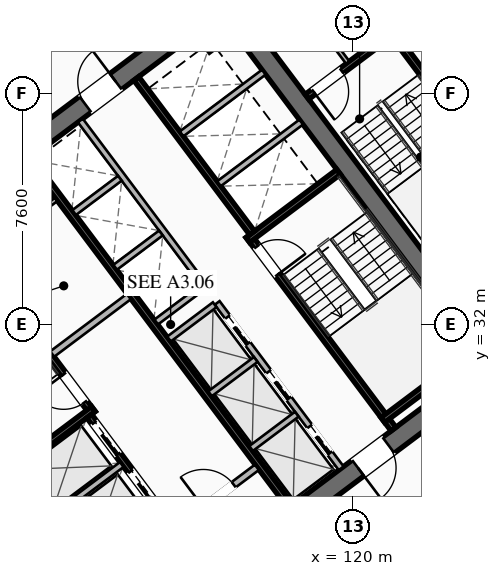
"""IFC4 building model, lengths in metres.
Left out: names, types, materials, properties, quantities, classifications, styles, units other than length and angle.
Written with IfcOpenShell. Run it as: python <this file> out.ifc"""

import sys

from ifc_helpers import new_model, si_unit, direction, frame, frame_2d, origin, place, context, subcontext, project, spatial, rectangle, extrude, element, fill, save


model = new_model("IFC4")
c1 = context("Model", 3, precision=1e-05, world=origin(), true_north=direction((0.0, 1.0)))
c2 = subcontext(c1, "Body", "Model", "MODEL_VIEW")
j1 = project(units=[si_unit("LENGTHUNIT", "METRE"), si_unit("PLANEANGLEUNIT", "RADIAN")], contexts=[c1])
p1 = place(None, origin())
s1 = spatial("IfcSite", under=j1, at=p1, CompositionType="ELEMENT")
p2 = place(p1, origin())
s2 = spatial("IfcBuilding", under=s1, at=p2, CompositionType="ELEMENT")
p3 = place(p2, frame((0.0, 0.0, 77.85)))
s3 = spatial("IfcBuildingStorey", under=s2, at=p3, CompositionType="ELEMENT", Elevation=77.85)
for number, where, z_axis, x_axis in (
    (1, (112.476, 21.107, 0.0), (0.0, 0.0, 1.0), (-0.6, 0.8, 0.0)),
    (2, (115.524, 42.893, 0.0), (0.0, 0.0, 1.0), (0.6, -0.8, 0.0)),
):
    element("IfcWall", number, at=place(p3, frame(where, z_axis=z_axis, x_axis=x_axis)), inside=s3, PredefinedType="SHEAR", context=c2, shape_type="SweptSolid", body=[
        extrude(rectangle(XDim=15.6, YDim=0.65, at=frame_2d((7.8, 0.0))), origin(), (0.0, 0.0, 1.0), 3.55),
    ])
p4 = place(p3, frame((124.429, 30.478, 0.0), z_axis=(0.0, 0.0, 1.0), x_axis=(-0.799998028465, -0.600002628705, 0.0)))
e3 = element("IfcWall", 3, at=p4, inside=s3, PredefinedType="SHEAR", context=c2, shape_type="SweptSolid", body=[
    extrude(rectangle(XDim=14.86, YDim=0.65, at=frame_2d((7.43, 0.0))), origin(), (0.0, 0.0, 1.0), 3.55),
])
p5 = place(p4, frame((9.13, 0.0, 0.0)))
e4 = element("IfcOpeningElement", 4, at=p5, cuts=e3, PredefinedType="OPENING", context=c2, shape_type="SweptSolid", body=[
    extrude(rectangle(XDim=1.25, YDim=2.25, at=frame_2d((0.625, 1.125))), frame((0.0, 0.335, 0.0), z_axis=(0.0, -1.0, 0.0), x_axis=(1.0, 0.0, 0.0)), (0.0, 0.0, 1.0), 0.67),
])
p6 = place(p4, frame((4.08, 0.0, 0.0)))
e5 = element("IfcOpeningElement", 5, at=p6, cuts=e3, PredefinedType="OPENING", context=c2, shape_type="SweptSolid", body=[
    extrude(rectangle(XDim=1.25, YDim=2.25, at=frame_2d((0.625, 1.125))), frame((0.0, 0.335, 0.0), z_axis=(0.0, -1.0, 0.0), x_axis=(1.0, 0.0, 0.0)), (0.0, 0.0, 1.0), 0.67),
])
p7 = place(p3, frame((103.571, 33.522, 0.0), z_axis=(0.0, 0.0, 1.0), x_axis=(0.799998028465, 0.600002628705, 0.0)))
e6 = element("IfcWall", 6, at=p7, inside=s3, PredefinedType="SHEAR", context=c2, shape_type="SweptSolid", body=[
    extrude(rectangle(XDim=14.86, YDim=0.65, at=frame_2d((7.43, 0.0))), origin(), (0.0, 0.0, 1.0), 3.55),
])
p8 = place(p7, frame((4.48, 0.0, 0.0)))
e7 = element("IfcOpeningElement", 7, at=p8, cuts=e6, PredefinedType="OPENING", context=c2, shape_type="SweptSolid", body=[
    extrude(rectangle(XDim=1.25, YDim=2.25, at=frame_2d((0.625, 1.125))), frame((0.0, 0.335, 0.0), z_axis=(0.0, -1.0, 0.0), x_axis=(1.0, 0.0, 0.0)), (0.0, 0.0, 1.0), 0.67),
])
p9 = place(p7, frame((9.53, 0.0, 0.0)))
e8 = element("IfcOpeningElement", 8, at=p9, cuts=e6, PredefinedType="OPENING", context=c2, shape_type="SweptSolid", body=[
    extrude(rectangle(XDim=1.25, YDim=2.25, at=frame_2d((0.625, 1.125))), frame((0.0, 0.335, 0.0), z_axis=(0.0, -1.0, 0.0), x_axis=(1.0, 0.0, 0.0)), (0.0, 0.0, 1.0), 0.67),
])
p10 = place(p3, frame((111.44, 29.08, 0.0), z_axis=(0.0, 0.0, 1.0), x_axis=(-0.600009827119, 0.799992629566, 0.0)))
e9 = element("IfcWall", 9, at=p10, inside=s3, PredefinedType="SHEAR", context=c2, shape_type="SweptSolid", body=[
    extrude(rectangle(XDim=7.95, YDim=0.2, at=frame_2d((3.975, 0.0))), origin(), (0.0, 0.0, 1.0), 3.35),
])
p11 = place(p10, frame((0.45, 0.0, 0.0)))
e10 = element("IfcOpeningElement", 10, at=p11, cuts=e9, PredefinedType="OPENING", context=c2, shape_type="SweptSolid", body=[
    extrude(rectangle(XDim=1.15, YDim=2.2, at=frame_2d((0.575, 1.1))), frame((0.0, 0.11, 0.0), z_axis=(0.0, -1.0, 0.0), x_axis=(1.0, 0.0, 0.0)), (0.0, 0.0, 1.0), 0.22),
])
p12 = place(p3, frame((108.476, 26.982, 0.0), z_axis=(0.0, 0.0, 1.0), x_axis=(0.799984290658, 0.600020945218, 0.0)))
e11 = element("IfcWall", 11, at=p12, inside=s3, PredefinedType="SHEAR", context=c2, shape_type="SweptSolid", body=[
    extrude(rectangle(XDim=3.73, YDim=0.2, at=frame_2d((1.865, 0.0))), origin(), (0.0, 0.0, 1.0), 3.35),
])
p13 = place(p3, frame((116.56, 34.92, 0.0), z_axis=(0.0, 0.0, 1.0), x_axis=(0.600009827119, -0.799992629566, 0.0)))
e12 = element("IfcWall", 12, at=p13, inside=s3, PredefinedType="SHEAR", context=c2, shape_type="SweptSolid", body=[
    extrude(rectangle(XDim=7.95, YDim=0.2, at=frame_2d((3.975, 0.0))), origin(), (0.0, 0.0, 1.0), 3.35),
])
p14 = place(p13, frame((0.45, 0.0, 0.0)))
e13 = element("IfcOpeningElement", 13, at=p14, cuts=e12, PredefinedType="OPENING", context=c2, shape_type="SweptSolid", body=[
    extrude(rectangle(XDim=1.15, YDim=2.2, at=frame_2d((0.575, 1.1))), frame((0.0, 0.11, 0.0), z_axis=(0.0, -1.0, 0.0), x_axis=(1.0, 0.0, 0.0)), (0.0, 0.0, 1.0), 0.22),
])
for number, where, z_axis, x_axis in (
    (14, (116.54, 34.78, 0.0), (0.0, 0.0, 1.0), (0.8, 0.6, 0.0)),
    (15, (120.98, 28.86, 0.0), (0.0, 0.0, 1.0), (0.8, 0.6, 0.0)),
):
    element("IfcWall", number, at=place(p3, frame(where, z_axis=z_axis, x_axis=x_axis)), inside=s3, PredefinedType="SHEAR", context=c2, shape_type="SweptSolid", body=[
        extrude(rectangle(XDim=3.73, YDim=0.2, at=frame_2d((1.865, 0.0))), origin(), (0.0, 0.0, 1.0), 3.35),
    ])
p15 = place(p3, frame((117.938, 26.016, 0.0), z_axis=(0.0, 0.0, 1.0), x_axis=(-0.600005463273, 0.799995902516, 0.0)))
e16 = element("IfcWall", 16, at=p15, inside=s3, PredefinedType="SHEAR", context=c2, shape_type="SweptSolid", body=[
    extrude(rectangle(XDim=14.3, YDim=0.2, at=frame_2d((7.15, 0.0))), origin(), (0.0, 0.0, 1.0), 3.35),
])
p16 = place(p3, frame((110.104, 31.028, 0.0), z_axis=(0.0, 0.0, 1.0), x_axis=(0.800018601094, 0.59997519774, 0.0)))
e17 = element("IfcWall", 17, at=p16, inside=s3, PredefinedType="SOLIDWALL", context=c2, shape_type="SweptSolid", body=[
    extrude(rectangle(XDim=3.15, YDim=0.22, at=frame_2d((1.575, 0.0))), origin(), (0.0, 0.0, 1.0), 2.703),
])
p17 = place(p3, frame((114.316, 25.412, 0.0), z_axis=(0.0, 0.0, 1.0), x_axis=(0.800018601094, 0.59997519774, 0.0)))
e18 = element("IfcWall", 18, at=p17, inside=s3, PredefinedType="SOLIDWALL", context=c2, shape_type="SweptSolid", body=[
    extrude(rectangle(XDim=3.15, YDim=0.22, at=frame_2d((1.575, 0.0))), origin(), (0.0, 0.0, 1.0), 2.703),
])
p18 = place(p17, frame((0.95, 0.0, 0.0)))
e19 = element("IfcOpeningElement", 19, at=p18, cuts=e18, PredefinedType="OPENING", context=c2, shape_type="SweptSolid", body=[
    extrude(rectangle(XDim=1.25, YDim=2.25, at=frame_2d((0.625, 1.125))), frame((0.0, 0.12, 0.0), z_axis=(0.0, -1.0, 0.0), x_axis=(1.0, 0.0, 0.0)), (0.0, 0.0, 1.0), 0.24),
])
p19 = place(p3, frame((115.13, 23.91, 0.0), z_axis=(0.0, 0.0, 1.0), x_axis=(-0.599975393228, 0.800018454488, 0.0)))
e20 = element("IfcWall", 20, at=p19, inside=s3, PredefinedType="SHEAR", context=c2, shape_type="SweptSolid", body=[
    extrude(rectangle(XDim=6.35, YDim=0.2, at=frame_2d((3.175, 0.0))), origin(), (0.0, 0.0, 1.0), 3.35),
])
p20 = place(p19, frame((4.775, 0.0, 0.0)))
e21 = element("IfcOpeningElement", 21, at=p20, cuts=e20, PredefinedType="OPENING", context=c2, shape_type="SweptSolid", body=[
    extrude(rectangle(XDim=1.3, YDim=2.25, at=frame_2d((0.65, 1.125))), frame((0.0, 0.11, 0.0), z_axis=(0.0, -1.0, 0.0), x_axis=(1.0, 0.0, 0.0)), (0.0, 0.0, 1.0), 0.22),
])
p21 = place(p19, frame((2.775, 0.0, 0.0)))
e22 = element("IfcOpeningElement", 22, at=p21, cuts=e20, PredefinedType="OPENING", context=c2, shape_type="SweptSolid", body=[
    extrude(rectangle(XDim=1.3, YDim=2.25, at=frame_2d((0.65, 1.125))), frame((0.0, 0.11, 0.0), z_axis=(0.0, -1.0, 0.0), x_axis=(1.0, 0.0, 0.0)), (0.0, 0.0, 1.0), 0.22),
])
p22 = place(p19, frame((0.575, 0.0, 0.0)))
e23 = element("IfcOpeningElement", 23, at=p22, cuts=e20, PredefinedType="OPENING", context=c2, shape_type="SweptSolid", body=[
    extrude(rectangle(XDim=1.3, YDim=2.25, at=frame_2d((0.65, 1.125))), frame((0.0, 0.11, 0.0), z_axis=(0.0, -1.0, 0.0), x_axis=(1.0, 0.0, 0.0)), (0.0, 0.0, 1.0), 0.22),
])
p23 = place(p3, frame((109.688, 25.366, 0.0), z_axis=(0.0, 0.0, 1.0), x_axis=(0.8, 0.6, 0.0)))
e24 = element("IfcWall", 24, at=p23, inside=s3, PredefinedType="SOLIDWALL", context=c2, shape_type="SweptSolid", body=[
    extrude(rectangle(XDim=3.38, YDim=0.2, at=frame_2d((1.69, 0.0))), origin(), (0.0, 0.0, 1.0), 3.35),
])
p24 = place(p3, frame((112.87, 40.09, 0.0), z_axis=(0.0, 0.0, 1.0), x_axis=(0.599975393228, -0.800018454488, 0.0)))
e25 = element("IfcWall", 25, at=p24, inside=s3, PredefinedType="SHEAR", context=c2, shape_type="SweptSolid", body=[
    extrude(rectangle(XDim=6.35, YDim=0.2, at=frame_2d((3.175, 0.0))), origin(), (0.0, 0.0, 1.0), 3.35),
])
for number, where, z_axis, x_axis in (
    (26, (115.59, 36.63, 0.0), (0.0, 0.0, 1.0), (0.8, 0.6, 0.0)),
    (27, (114.36, 38.27, 0.0), (0.0, 0.0, 1.0), (0.8, 0.6, 0.0)),
):
    element("IfcWall", number, at=place(p3, frame(where, z_axis=z_axis, x_axis=x_axis)), inside=s3, PredefinedType="SOLIDWALL", context=c2, shape_type="SweptSolid", body=[
        extrude(rectangle(XDim=3.38, YDim=0.2, at=frame_2d((1.69, 0.0))), origin(), (0.0, 0.0, 1.0), 3.35),
    ])
p25 = place(p3, frame((107.71, 34.22, 0.0), z_axis=(0.0, 0.0, 1.0), x_axis=(0.799981399002, 0.60002480053, 0.0)))
e28 = element("IfcWall", 28, at=p25, inside=s3, PredefinedType="PARTITIONING", context=c2, shape_type="SweptSolid", body=[
    extrude(rectangle(XDim=3.15, YDim=0.135, at=frame_2d((1.575, 0.0))), origin(), (0.0, 0.0, 1.0), 2.703),
])
p26 = place(p25, frame((1.05, 0.0, 0.0)))
e29 = element("IfcOpeningElement", 29, at=p26, cuts=e28, PredefinedType="OPENING", context=c2, shape_type="SweptSolid", body=[
    extrude(rectangle(XDim=1.05, YDim=2.2, at=frame_2d((0.525, 1.1))), frame((0.0, 0.077, 0.0), z_axis=(0.0, -1.0, 0.0), x_axis=(1.0, 0.0, 0.0)), (0.0, 0.0, 1.0), 0.155),
])
p27 = place(p3, frame((119.61, 27.27, 0.0), z_axis=(0.0, 0.0, 1.0), x_axis=(-0.600011488909, 0.79999138319, 0.0)))
e30 = element("IfcWall", 30, at=p27, inside=s3, PredefinedType="SOLIDWALL", context=c2, shape_type="SweptSolid", body=[
    extrude(rectangle(XDim=6.8, YDim=0.2, at=frame_2d((3.4, 0.0))), origin(), (0.0, 0.0, 1.0), 3.35),
])
p28 = place(p27, frame((0.625, 0.0, 0.0)))
e31 = element("IfcOpeningElement", 31, at=p28, cuts=e30, PredefinedType="OPENING", context=c2, shape_type="SweptSolid", body=[
    extrude(rectangle(XDim=1.1, YDim=2.2, at=frame_2d((0.55, 1.1))), frame((0.0, 0.11, 0.0), z_axis=(0.0, -1.0, 0.0), x_axis=(1.0, 0.0, 0.0)), (0.0, 0.0, 1.0), 0.22),
])
p29 = place(p27, frame((2.875, 0.0, 0.0)))
e32 = element("IfcOpeningElement", 32, at=p29, cuts=e30, PredefinedType="OPENING", context=c2, shape_type="SweptSolid", body=[
    extrude(rectangle(XDim=1.1, YDim=2.2, at=frame_2d((0.55, 1.1))), frame((0.0, 0.11, 0.0), z_axis=(0.0, -1.0, 0.0), x_axis=(1.0, 0.0, 0.0)), (0.0, 0.0, 1.0), 0.22),
])
p30 = place(p27, frame((5.125, 0.0, 0.0)))
e33 = element("IfcOpeningElement", 33, at=p30, cuts=e30, PredefinedType="OPENING", context=c2, shape_type="SweptSolid", body=[
    extrude(rectangle(XDim=1.1, YDim=2.2, at=frame_2d((0.55, 1.1))), frame((0.0, 0.11, 0.0), z_axis=(0.0, -1.0, 0.0), x_axis=(1.0, 0.0, 0.0)), (0.0, 0.0, 1.0), 0.22),
])
p31 = place(p3, frame((116.646, 27.922, 0.0), z_axis=(0.0, 0.0, 1.0), x_axis=(0.8, 0.6, 0.0)))
e34 = element("IfcWall", 34, at=p31, inside=s3, PredefinedType="SOLIDWALL", context=c2, shape_type="SweptSolid", body=[
    extrude(rectangle(XDim=1.88, YDim=0.2, at=frame_2d((0.94, 0.0))), origin(), (0.0, 0.0, 1.0), 3.35),
])
p32 = place(p3, frame((115.296, 29.722, 0.0), z_axis=(0.0, 0.0, 1.0), x_axis=(0.799984418148, 0.600020775241, 0.0)))
e35 = element("IfcWall", 35, at=p32, inside=s3, PredefinedType="SOLIDWALL", context=c2, shape_type="SweptSolid", body=[
    extrude(rectangle(XDim=1.88, YDim=0.2, at=frame_2d((0.94, 0.0))), origin(), (0.0, 0.0, 1.0), 3.35),
])
p33 = place(p3, frame((113.946, 31.522, 0.0), z_axis=(0.0, 0.0, 1.0), x_axis=(0.8, 0.6, 0.0)))
e36 = element("IfcWall", 36, at=p33, inside=s3, PredefinedType="SOLIDWALL", context=c2, shape_type="SweptSolid", body=[
    extrude(rectangle(XDim=1.88, YDim=0.2, at=frame_2d((0.94, 0.0))), origin(), (0.0, 0.0, 1.0), 3.35),
])
p34 = place(p3, frame((115.11, 33.27, 0.0), z_axis=(0.0, 0.0, 1.0), x_axis=(-0.600011488909, 0.79999138319, 0.0)))
e37 = element("IfcWall", 37, at=p34, inside=s3, PredefinedType="SOLIDWALL", context=c2, shape_type="SweptSolid", body=[
    extrude(rectangle(XDim=6.8, YDim=0.2, at=frame_2d((3.4, 0.0))), origin(), (0.0, 0.0, 1.0), 3.35),
])
p35 = place(p3, frame((113.526, 32.082, 0.0), z_axis=(0.0, 0.0, 1.0), x_axis=(0.800046745961, 0.599937666993, 0.0)))
e38 = element("IfcWall", 38, at=p35, inside=s3, PredefinedType="SOLIDWALL", context=c2, shape_type="SweptSolid", body=[
    extrude(rectangle(XDim=1.88, YDim=0.2, at=frame_2d((0.94, 0.0))), origin(), (0.0, 0.0, 1.0), 3.35),
])
p36 = place(p3, frame((112.176, 33.882, 0.0), z_axis=(0.0, 0.0, 1.0), x_axis=(0.8, 0.6, 0.0)))
e39 = element("IfcWall", 39, at=p36, inside=s3, PredefinedType="SOLIDWALL", context=c2, shape_type="SweptSolid", body=[
    extrude(rectangle(XDim=1.88, YDim=0.2, at=frame_2d((0.94, 0.0))), origin(), (0.0, 0.0, 1.0), 3.35),
])
p37 = place(p3, frame((110.826, 35.682, 0.0), z_axis=(0.0, 0.0, 1.0), x_axis=(0.799984418148, 0.600020775241, 0.0)))
e40 = element("IfcWall", 40, at=p37, inside=s3, PredefinedType="SOLIDWALL", context=c2, shape_type="SweptSolid", body=[
    extrude(rectangle(XDim=1.88, YDim=0.2, at=frame_2d((0.94, 0.0))), origin(), (0.0, 0.0, 1.0), 3.35),
])
p38 = place(p3, frame((125.304, 36.228, 0.0), z_axis=(0.0, 0.0, 1.0), x_axis=(-0.59998851072, 0.800008616831, 0.0)))
e41 = element("IfcWall", 41, at=p38, inside=s3, PredefinedType="SHEAR", context=c2, shape_type="SweptSolid", body=[
    extrude(rectangle(XDim=6.8, YDim=0.2, at=frame_2d((3.4, 0.0))), origin(), (0.0, 0.0, 1.0), 3.35),
])
p39 = place(p3, frame((121.204, 41.528, 0.0), z_axis=(0.0, 0.0, 1.0), x_axis=(-0.800017232136, -0.599977023131, 0.0)))
e42 = element("IfcWall", 42, at=p39, inside=s3, PredefinedType="SHEAR", context=c2, shape_type="SweptSolid", body=[
    extrude(rectangle(XDim=3.4, YDim=0.2, at=frame_2d((1.7, 0.0))), origin(), (0.0, 0.0, 1.0), 3.35),
])
p40 = place(p39, frame((1.975, 0.0, 0.0)))
e43 = element("IfcOpeningElement", 43, at=p40, cuts=e42, PredefinedType="OPENING", context=c2, shape_type="SweptSolid", body=[
    extrude(rectangle(XDim=1.15, YDim=2.2, at=frame_2d((0.575, 1.1))), frame((0.0, 0.11, 0.0), z_axis=(0.0, -1.0, 0.0), x_axis=(1.0, 0.0, 0.0)), (0.0, 0.0, 1.0), 0.22),
])
p41 = place(p3, frame((119.824, 40.618, 0.0), z_axis=(0.0, 0.0, 1.0), x_axis=(-0.599982243973, 0.800013316712, 0.0)))
e44 = element("IfcWall", 44, at=p41, inside=s3, PredefinedType="PARTITIONING", context=c2, shape_type="SweptSolid", body=[
    extrude(rectangle(XDim=4.4, YDim=0.135, at=frame_2d((2.2, 0.0))), origin(), (0.0, 0.0, 1.0), 2.703),
])
p42 = place(p3, frame((98.516, 34.012, 0.0), z_axis=(0.0, 0.0, 1.0), x_axis=(0.8, 0.6, 0.0)))
e45 = element("IfcWall", 45, at=p42, inside=s3, PredefinedType="PARTITIONING", context=c2, shape_type="SweptSolid", body=[
    extrude(rectangle(XDim=28.23, YDim=0.135, at=frame_2d((14.115, 0.0))), origin(), (0.0, 0.0, 1.0), 2.703),
])
p43 = place(p42, frame((0.3, 0.0, 0.0)))
e46 = element("IfcOpeningElement", 46, at=p43, cuts=e45, PredefinedType="OPENING", context=c2, shape_type="SweptSolid", body=[
    extrude(rectangle(XDim=0.95, YDim=2.05, at=frame_2d((0.475, 1.025))), frame((0.0, 0.077, 0.0), z_axis=(0.0, -1.0, 0.0), x_axis=(1.0, 0.0, 0.0)), (0.0, 0.0, 1.0), 0.155),
])
p44 = place(p42, frame((11.004, 0.0, 0.0)))
e47 = element("IfcOpeningElement", 47, at=p44, cuts=e45, PredefinedType="OPENING", context=c2, shape_type="SweptSolid", body=[
    extrude(rectangle(XDim=0.95, YDim=2.05, at=frame_2d((0.475, 1.025))), frame((0.0, 0.077, 0.0), z_axis=(0.0, -1.0, 0.0), x_axis=(1.0, 0.0, 0.0)), (0.0, 0.0, 1.0), 0.155),
])
p45 = place(p42, frame((26.98, 0.0, 0.0)))
e48 = element("IfcOpeningElement", 48, at=p45, cuts=e45, PredefinedType="OPENING", context=c2, shape_type="SweptSolid", body=[
    extrude(rectangle(XDim=0.95, YDim=2.05, at=frame_2d((0.475, 1.025))), frame((0.0, 0.077, 0.0), z_axis=(0.0, -1.0, 0.0), x_axis=(1.0, 0.0, 0.0)), (0.0, 0.0, 1.0), 0.155),
])
p46 = place(p3, frame((134.18, 33.51, 0.0), z_axis=(0.0, 0.0, 1.0), x_axis=(-0.8, -0.6, 0.0)))
e49 = element("IfcWall", 49, at=p46, inside=s3, PredefinedType="PARTITIONING", context=c2, shape_type="SweptSolid", body=[
    extrude(rectangle(XDim=28.23, YDim=0.135, at=frame_2d((14.115, 0.0))), origin(), (0.0, 0.0, 1.0), 2.703),
])
p47 = place(p46, frame((26.9, 0.0, 0.0)))
e50 = element("IfcOpeningElement", 50, at=p47, cuts=e49, PredefinedType="OPENING", context=c2, shape_type="SweptSolid", body=[
    extrude(rectangle(XDim=0.95, YDim=2.05, at=frame_2d((0.475, 1.025))), frame((0.0, 0.077, 0.0), z_axis=(0.0, -1.0, 0.0), x_axis=(1.0, 0.0, 0.0)), (0.0, 0.0, 1.0), 0.155),
])
p48 = place(p46, frame((16.453, 0.0, 0.0)))
e51 = element("IfcOpeningElement", 51, at=p48, cuts=e49, PredefinedType="OPENING", context=c2, shape_type="SweptSolid", body=[
    extrude(rectangle(XDim=0.95, YDim=2.05, at=frame_2d((0.475, 1.025))), frame((0.0, 0.077, 0.0), z_axis=(0.0, -1.0, 0.0), x_axis=(1.0, 0.0, 0.0)), (0.0, 0.0, 1.0), 0.155),
])
p49 = place(p46, frame((0.38, 0.0, 0.0)))
e52 = element("IfcOpeningElement", 52, at=p49, cuts=e49, PredefinedType="OPENING", context=c2, shape_type="SweptSolid", body=[
    extrude(rectangle(XDim=0.95, YDim=2.05, at=frame_2d((0.475, 1.025))), frame((0.0, 0.077, 0.0), z_axis=(0.0, -1.0, 0.0), x_axis=(1.0, 0.0, 0.0)), (0.0, 0.0, 1.0), 0.155),
])
p50 = place(p3, frame((111.548, 16.636, 0.0), z_axis=(0.0, 0.0, 1.0), x_axis=(-0.600003610192, 0.799997292343, 0.0)))
e53 = element("IfcWall", 53, at=p50, inside=s3, PredefinedType="PARTITIONING", context=c2, shape_type="SweptSolid", body=[
    extrude(rectangle(XDim=21.64, YDim=0.135, at=frame_2d((10.82, 0.0))), origin(), (0.0, 0.0, 1.0), 2.703),
])
p51 = place(p50, frame((0.3, 0.0, 0.0)))
e54 = element("IfcOpeningElement", 54, at=p51, cuts=e53, PredefinedType="OPENING", context=c2, shape_type="SweptSolid", body=[
    extrude(rectangle(XDim=0.95, YDim=2.05, at=frame_2d((0.475, 1.025))), frame((0.0, 0.077, 0.0), z_axis=(0.0, -1.0, 0.0), x_axis=(1.0, 0.0, 0.0)), (0.0, 0.0, 1.0), 0.155),
])
p52 = place(p9, origin())
e55 = element("IfcDoor", 55, at=p52, inside=s3, OperationType="SINGLE_SWING_RIGHT", PredefinedType="DOOR", context=c2, shape_type="SweptSolid", body=[
    extrude(rectangle(XDim=1.25, YDim=2.25, at=frame_2d((0.625, 1.125))), frame((0.0, 0.025, 0.0), z_axis=(0.0, -1.0, 0.0), x_axis=(1.0, 0.0, 0.0)), (0.0, 0.0, 1.0), 0.05),
])
fill(e8, e55)
p53 = place(p6, origin())
e56 = element("IfcDoor", 56, at=p53, inside=s3, OperationType="SINGLE_SWING_RIGHT", PredefinedType="DOOR", context=c2, shape_type="SweptSolid", body=[
    extrude(rectangle(XDim=1.25, YDim=2.25, at=frame_2d((0.625, 1.125))), frame((0.0, 0.025, 0.0), z_axis=(0.0, -1.0, 0.0), x_axis=(1.0, 0.0, 0.0)), (0.0, 0.0, 1.0), 0.05),
])
fill(e5, e56)
p54 = place(p11, origin())
e57 = element("IfcDoor", 57, at=p54, inside=s3, OperationType="SINGLE_SWING_RIGHT", PredefinedType="DOOR", context=c2, shape_type="SweptSolid", body=[
    extrude(rectangle(XDim=1.15, YDim=2.2, at=frame_2d((0.575, 1.1))), frame((0.0, 0.025, 0.0), z_axis=(0.0, -1.0, 0.0), x_axis=(1.0, 0.0, 0.0)), (0.0, 0.0, 1.0), 0.05),
])
fill(e10, e57)
p55 = place(p14, origin())
e58 = element("IfcDoor", 58, at=p55, inside=s3, OperationType="SINGLE_SWING_RIGHT", PredefinedType="DOOR", context=c2, shape_type="SweptSolid", body=[
    extrude(rectangle(XDim=1.15, YDim=2.2, at=frame_2d((0.575, 1.1))), frame((0.0, 0.025, 0.0), z_axis=(0.0, -1.0, 0.0), x_axis=(1.0, 0.0, 0.0)), (0.0, 0.0, 1.0), 0.05),
])
fill(e13, e58)
p56 = place(p18, origin())
e59 = element("IfcDoor", 59, at=p56, inside=s3, OperationType="SINGLE_SWING_LEFT", PredefinedType="DOOR", context=c2, shape_type="SweptSolid", body=[
    extrude(rectangle(XDim=1.25, YDim=2.25, at=frame_2d((0.625, 1.125))), frame((0.0, 0.025, 0.0), z_axis=(0.0, -1.0, 0.0), x_axis=(1.0, 0.0, 0.0)), (0.0, 0.0, 1.0), 0.05),
])
fill(e19, e59)
p57 = place(p40, origin())
e60 = element("IfcDoor", 60, at=p57, inside=s3, OperationType="SINGLE_SWING_RIGHT", PredefinedType="DOOR", context=c2, shape_type="SweptSolid", body=[
    extrude(rectangle(XDim=1.15, YDim=2.2, at=frame_2d((0.575, 1.1))), frame((0.0, 0.025, 0.0), z_axis=(0.0, -1.0, 0.0), x_axis=(1.0, 0.0, 0.0)), (0.0, 0.0, 1.0), 0.05),
])
fill(e43, e60)
p58 = place(p20, origin())
e61 = element("IfcDoor", 61, at=p58, inside=s3, OperationType="SLIDING_TO_LEFT", PredefinedType="DOOR", context=c2, shape_type="SweptSolid", body=[
    extrude(rectangle(XDim=1.3, YDim=2.25, at=frame_2d((0.65, 1.125))), frame((0.0, 0.025, 0.0), z_axis=(0.0, -1.0, 0.0), x_axis=(1.0, 0.0, 0.0)), (0.0, 0.0, 1.0), 0.05),
])
fill(e21, e61)
p59 = place(p21, origin())
e62 = element("IfcDoor", 62, at=p59, inside=s3, OperationType="SLIDING_TO_LEFT", PredefinedType="DOOR", context=c2, shape_type="SweptSolid", body=[
    extrude(rectangle(XDim=1.3, YDim=2.25, at=frame_2d((0.65, 1.125))), frame((0.0, 0.025, 0.0), z_axis=(0.0, -1.0, 0.0), x_axis=(1.0, 0.0, 0.0)), (0.0, 0.0, 1.0), 0.05),
])
fill(e22, e62)
p60 = place(p28, origin())
e63 = element("IfcDoor", 63, at=p60, inside=s3, OperationType="SLIDING_TO_LEFT", PredefinedType="DOOR", context=c2, shape_type="SweptSolid", body=[
    extrude(rectangle(XDim=1.1, YDim=2.2, at=frame_2d((0.55, 1.1))), frame((0.0, 0.025, 0.0), z_axis=(0.0, -1.0, 0.0), x_axis=(1.0, 0.0, 0.0)), (0.0, 0.0, 1.0), 0.05),
])
fill(e31, e63)
p61 = place(p29, origin())
e64 = element("IfcDoor", 64, at=p61, inside=s3, OperationType="SLIDING_TO_LEFT", PredefinedType="DOOR", context=c2, shape_type="SweptSolid", body=[
    extrude(rectangle(XDim=1.1, YDim=2.2, at=frame_2d((0.55, 1.1))), frame((0.0, 0.025, 0.0), z_axis=(0.0, -1.0, 0.0), x_axis=(1.0, 0.0, 0.0)), (0.0, 0.0, 1.0), 0.05),
])
fill(e32, e64)
p62 = place(p30, origin())
e65 = element("IfcDoor", 65, at=p62, inside=s3, OperationType="SLIDING_TO_LEFT", PredefinedType="DOOR", context=c2, shape_type="SweptSolid", body=[
    extrude(rectangle(XDim=1.1, YDim=2.2, at=frame_2d((0.55, 1.1))), frame((0.0, 0.025, 0.0), z_axis=(0.0, -1.0, 0.0), x_axis=(1.0, 0.0, 0.0)), (0.0, 0.0, 1.0), 0.05),
])
fill(e33, e65)
save(model, sys.argv[1])
